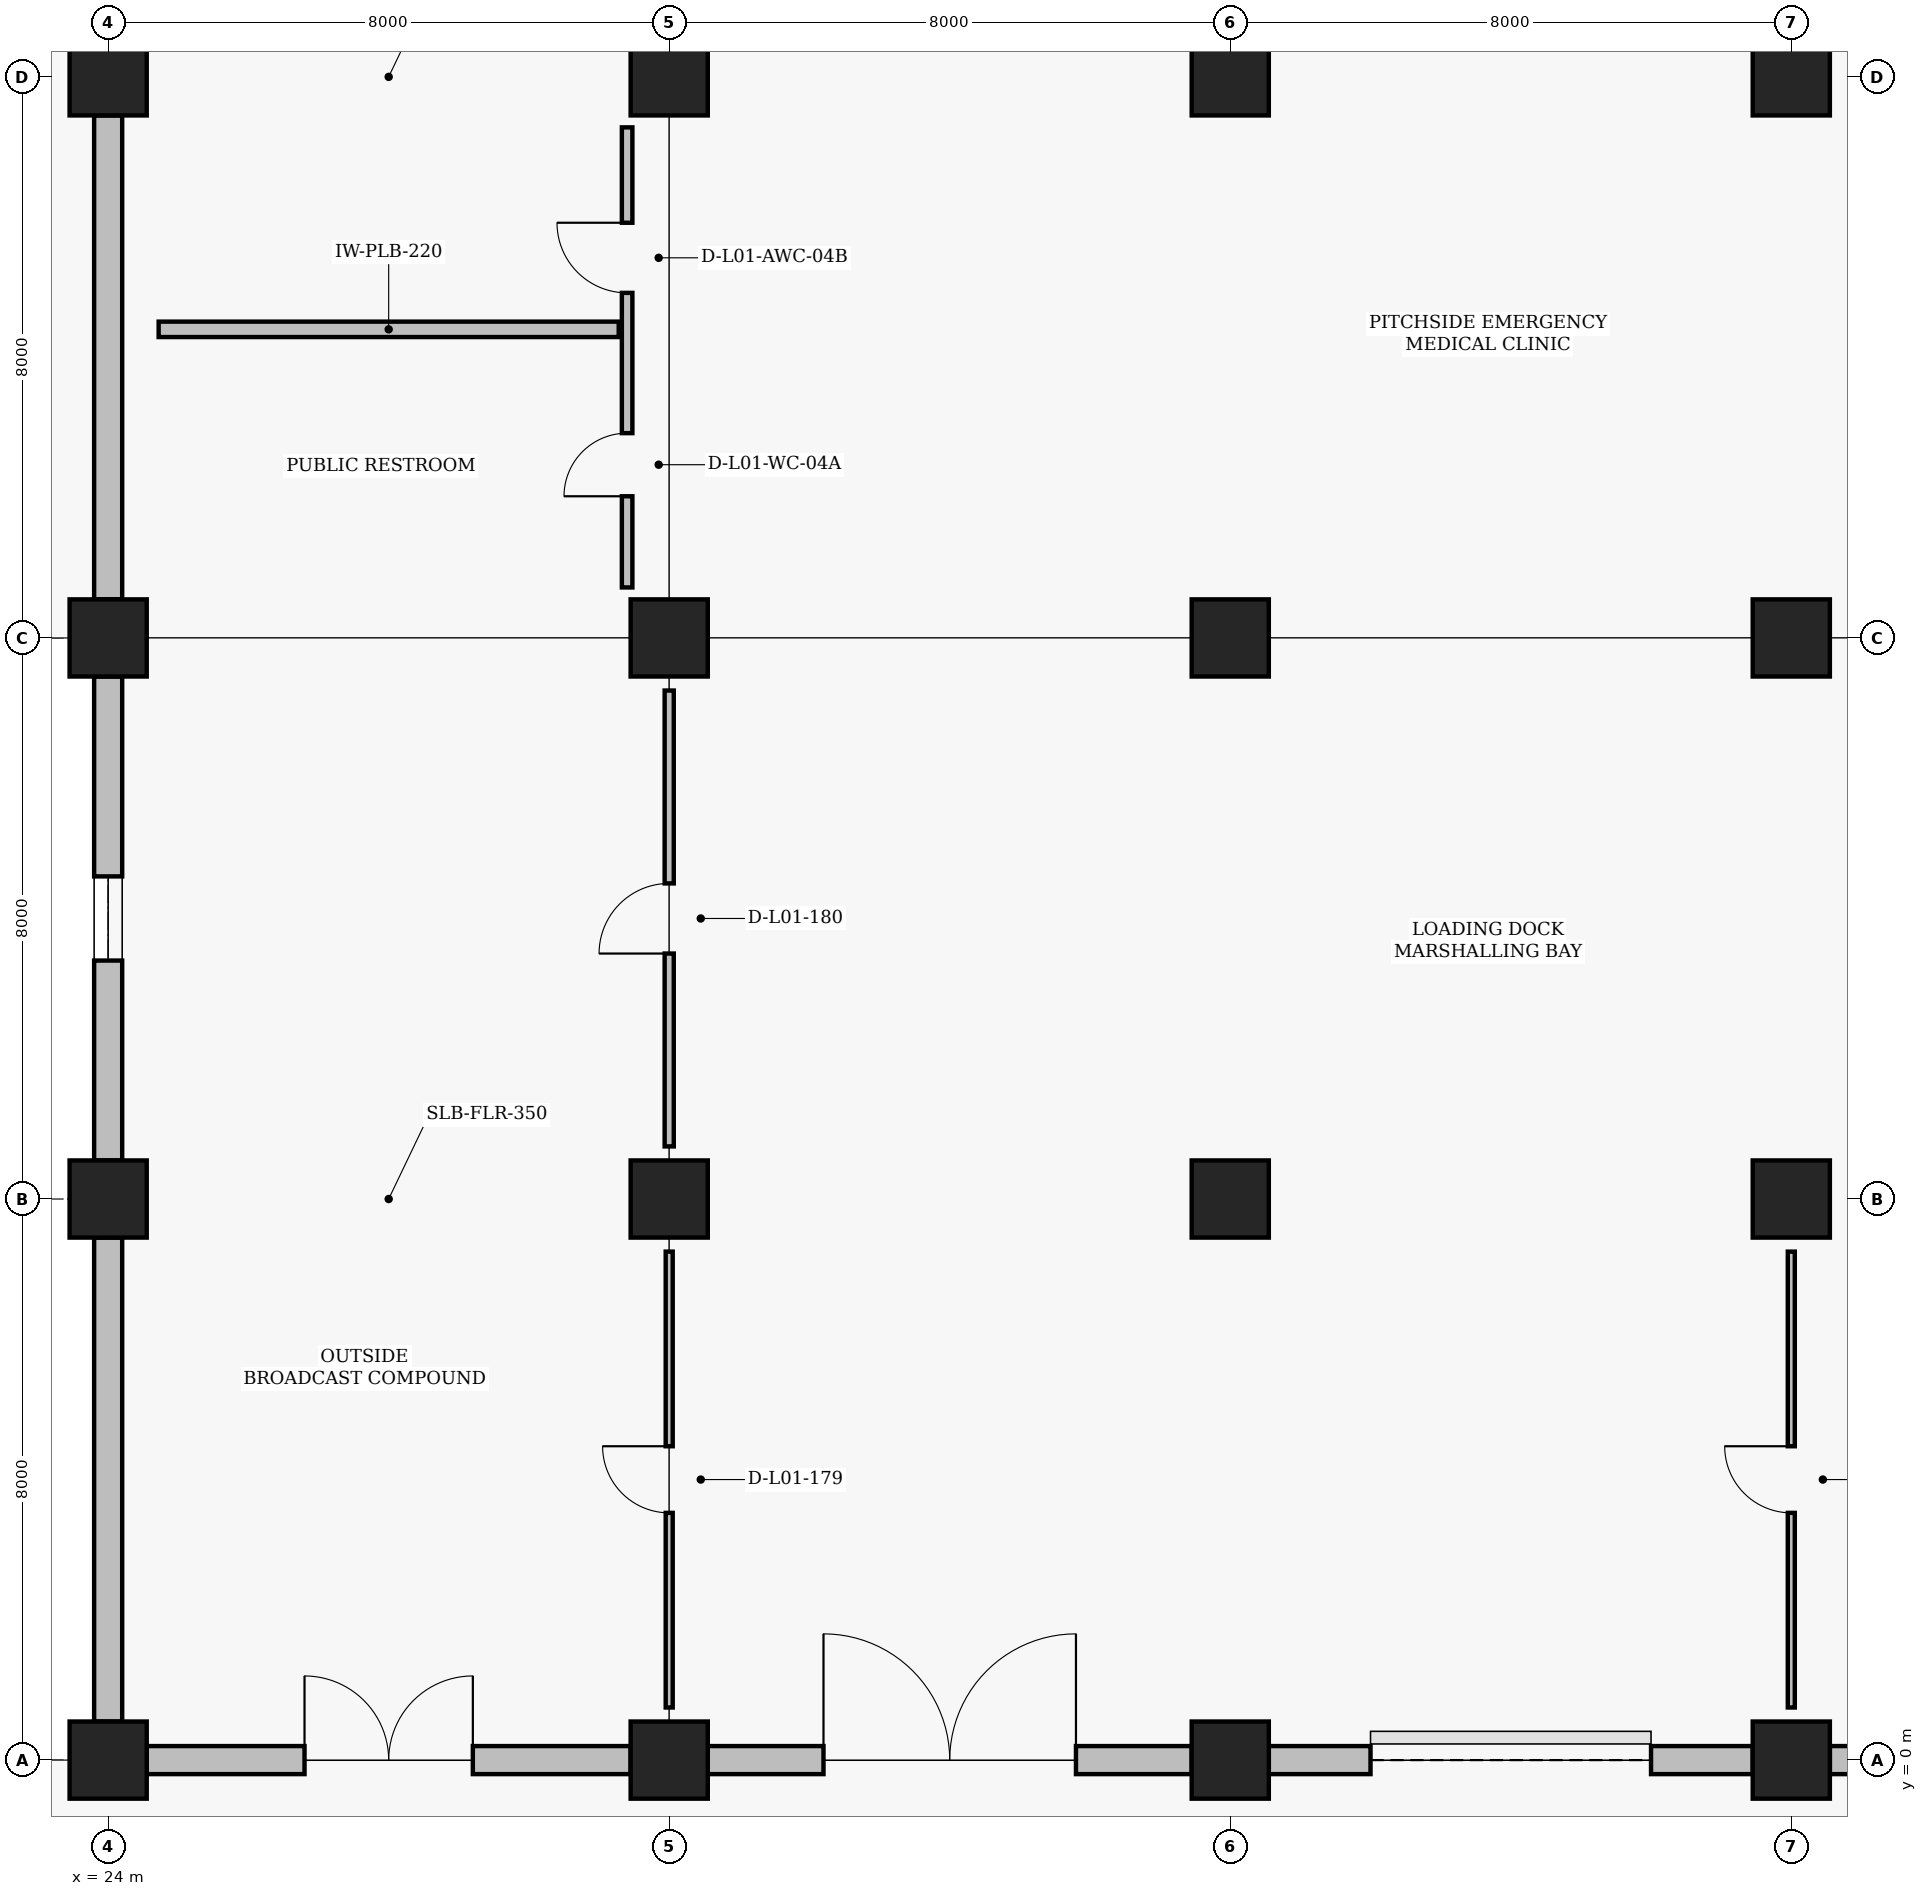
"""IFC4 building model, lengths in metres.
Left out: names, types, materials, properties, quantities, classifications, styles, units other than length and angle.
Written with IfcOpenShell. Run it as: python <this file> out.ifc"""

import sys

from ifc_helpers import new_model, si_unit, direction, frame, frame_2d, origin, origin_2d, place, context, subcontext, project, spatial, rectangle, extrude, element, fill, save


model = new_model("IFC4")
c1 = context("Model", 3, precision=1e-05, world=origin(), true_north=direction((0.0, 1.0)))
c2 = subcontext(c1, "Body", "Model", "MODEL_VIEW")
j1 = project(units=[si_unit("LENGTHUNIT", "METRE"), si_unit("PLANEANGLEUNIT", "RADIAN")], contexts=[c1])
p1 = place(None, origin())
s1 = spatial("IfcSite", under=j1, at=p1, CompositionType="ELEMENT")
p2 = place(p1, origin())
s2 = spatial("IfcBuilding", under=s1, at=p2, CompositionType="ELEMENT")
p3 = place(p2, origin())
s3 = spatial("IfcBuildingStorey", under=s2, at=p3, CompositionType="ELEMENT", Elevation=0.0)
for number, where, z_axis, x_axis in (
    (1, (24.0, 0.0, 0.0), (0.0, 0.0, 1.0), (1.0, 0.0, 0.0)),
    (2, (24.0, 8.0, 0.0), (0.0, 0.0, 1.0), (1.0, 0.0, 0.0)),
    (3, (24.0, 16.0, 0.0), (0.0, 0.0, 1.0), (1.0, 0.0, 0.0)),
    (4, (24.0, 24.0, 0.0), (0.0, 0.0, 1.0), (1.0, 0.0, 0.0)),
    (5, (32.0, 0.0, 0.0), (0.0, 0.0, 1.0), (1.0, 0.0, 0.0)),
    (6, (32.0, 8.0, 0.0), (0.0, 0.0, 1.0), (1.0, 0.0, 0.0)),
    (7, (32.0, 16.0, 0.0), (0.0, 0.0, 1.0), (1.0, 0.0, 0.0)),
    (8, (32.0, 24.0, 0.0), (0.0, 0.0, 1.0), (1.0, 0.0, 0.0)),
    (9, (40.0, 0.0, 0.0), (0.0, 0.0, 1.0), (1.0, 0.0, 0.0)),
    (10, (40.0, 8.0, 0.0), (0.0, 0.0, 1.0), (1.0, 0.0, 0.0)),
    (11, (40.0, 16.0, 0.0), (0.0, 0.0, 1.0), (1.0, 0.0, 0.0)),
    (12, (40.0, 24.0, 0.0), (0.0, 0.0, 1.0), (1.0, 0.0, 0.0)),
    (13, (48.0, 0.0, 0.0), (0.0, 0.0, 1.0), (1.0, 0.0, 0.0)),
    (14, (48.0, 8.0, 0.0), (0.0, 0.0, 1.0), (1.0, 0.0, 0.0)),
    (15, (48.0, 16.0, 0.0), (0.0, 0.0, 1.0), (1.0, 0.0, 0.0)),
    (16, (48.0, 24.0, 0.0), (0.0, 0.0, 1.0), (1.0, 0.0, 0.0)),
):
    element("IfcColumn", number, at=place(p3, frame(where, z_axis=z_axis, x_axis=x_axis)), inside=s3, PredefinedType="COLUMN", context=c2, shape_type="SweptSolid", body=[
        extrude(rectangle(XDim=1.1, YDim=1.1, at=origin_2d()), origin(), (0.0, 0.0, 1.0), 4.8),
    ])
p4 = place(p3, frame((24.55, 0.0, 0.0), z_axis=(0.0, 0.0, 1.0), x_axis=(1.0, 0.0, 0.0)))
e17 = element("IfcWall", 17, at=p4, inside=s3, PredefinedType="SOLIDWALL", context=c2, shape_type="SweptSolid", body=[
    extrude(rectangle(XDim=6.9, YDim=0.4, at=frame_2d((3.45, 0.0))), origin(), (0.0, 0.0, 1.0), 3.81),
])
p5 = place(p4, frame((2.25, 0.0, 0.0)))
e18 = element("IfcOpeningElement", 18, at=p5, cuts=e17, PredefinedType="OPENING", context=c2, shape_type="SweptSolid", body=[
    extrude(rectangle(XDim=2.4, YDim=2.4, at=frame_2d((1.2, 1.2))), frame((0.0, 0.21, 0.0), z_axis=(0.0, -1.0, 0.0), x_axis=(1.0, 0.0, 0.0)), (0.0, 0.0, 1.0), 0.42),
])
p6 = place(p3, frame((24.0, 0.55, 0.0), z_axis=(0.0, 0.0, 1.0), x_axis=(0.0, 1.0, 0.0)))
e19 = element("IfcWall", 19, at=p6, inside=s3, PredefinedType="SOLIDWALL", context=c2, shape_type="SweptSolid", body=[
    extrude(rectangle(XDim=6.9, YDim=0.4, at=frame_2d((3.45, 0.0))), origin(), (0.0, 0.0, 1.0), 3.95),
])
p7 = place(p3, frame((24.0, 8.55, 0.0), z_axis=(0.0, 0.0, 1.0), x_axis=(0.0, 1.0, 0.0)))
e20 = element("IfcWall", 20, at=p7, inside=s3, PredefinedType="SOLIDWALL", context=c2, shape_type="SweptSolid", body=[
    extrude(rectangle(XDim=6.9, YDim=0.4, at=frame_2d((3.45, 0.0))), origin(), (0.0, 0.0, 1.0), 3.72),
])
p8 = place(p7, frame((2.85, 0.0, 0.95)))
e21 = element("IfcOpeningElement", 21, at=p8, cuts=e20, PredefinedType="OPENING", context=c2, shape_type="SweptSolid", body=[
    extrude(rectangle(XDim=1.2, YDim=1.5, at=frame_2d((0.6, 0.75))), frame((0.0, 0.21, 0.0), z_axis=(0.0, -1.0, 0.0), x_axis=(1.0, 0.0, 0.0)), (0.0, 0.0, 1.0), 0.42),
])
p9 = place(p3, frame((24.0, 16.55, 0.0), z_axis=(0.0, 0.0, 1.0), x_axis=(0.0, 1.0, 0.0)))
e22 = element("IfcWall", 22, at=p9, inside=s3, PredefinedType="SOLIDWALL", context=c2, shape_type="SweptSolid", body=[
    extrude(rectangle(XDim=6.9, YDim=0.4, at=frame_2d((3.45, 0.0))), origin(), (0.0, 0.0, 1.0), 3.72),
])
p10 = place(p3, frame((32.55, 0.0, 0.0), z_axis=(0.0, 0.0, 1.0), x_axis=(1.0, 0.0, 0.0)))
e23 = element("IfcWall", 23, at=p10, inside=s3, PredefinedType="SOLIDWALL", context=c2, shape_type="SweptSolid", body=[
    extrude(rectangle(XDim=6.9, YDim=0.4, at=frame_2d((3.45, 0.0))), origin(), (0.0, 0.0, 1.0), 3.81),
])
p11 = place(p10, frame((1.65, 0.0, 0.0)))
e24 = element("IfcOpeningElement", 24, at=p11, cuts=e23, PredefinedType="OPENING", context=c2, shape_type="SweptSolid", body=[
    extrude(rectangle(XDim=3.6, YDim=2.8, at=frame_2d((1.8, 1.4))), frame((0.0, 0.21, 0.0), z_axis=(0.0, -1.0, 0.0), x_axis=(1.0, 0.0, 0.0)), (0.0, 0.0, 1.0), 0.42),
])
p12 = place(p3, frame((40.55, 0.0, 0.0), z_axis=(0.0, 0.0, 1.0), x_axis=(1.0, 0.0, 0.0)))
e25 = element("IfcWall", 25, at=p12, inside=s3, PredefinedType="SOLIDWALL", context=c2, shape_type="SweptSolid", body=[
    extrude(rectangle(XDim=6.9, YDim=0.4, at=frame_2d((3.45, 0.0))), origin(), (0.0, 0.0, 1.0), 3.81),
])
p13 = place(p12, frame((1.45, 0.0, 0.0)))
e26 = element("IfcOpeningElement", 26, at=p13, cuts=e25, PredefinedType="OPENING", context=c2, shape_type="SweptSolid", body=[
    extrude(rectangle(XDim=4.0, YDim=3.5, at=frame_2d((2.0, 1.75))), frame((0.0, 0.21, 0.0), z_axis=(0.0, -1.0, 0.0), x_axis=(1.0, 0.0, 0.0)), (0.0, 0.0, 1.0), 0.42),
])
p14 = place(p3, frame((48.55, 0.0, 0.0), z_axis=(0.0, 0.0, 1.0), x_axis=(1.0, 0.0, 0.0)))
e27 = element("IfcWall", 27, at=p14, inside=s3, PredefinedType="SOLIDWALL", context=c2, shape_type="SweptSolid", body=[
    extrude(rectangle(XDim=6.9, YDim=0.4, at=frame_2d((3.45, 0.0))), origin(), (0.0, 0.0, 1.0), 3.81),
])
p15 = place(p14, frame((1.75, 0.0, 0.0)))
e28 = element("IfcOpeningElement", 28, at=p15, cuts=e27, PredefinedType="OPENING", context=c2, shape_type="SweptSolid", body=[
    extrude(rectangle(XDim=3.4, YDim=2.75, at=frame_2d((1.7, 1.375))), frame((0.0, 0.21, 0.0), z_axis=(0.0, -1.0, 0.0), x_axis=(1.0, 0.0, 0.0)), (0.0, 0.0, 1.0), 0.42),
])
p16 = place(p3, frame((24.72, 20.4, 0.0), z_axis=(0.0, 0.0, 1.0), x_axis=(1.0, 0.0, 0.0)))
e29 = element("IfcWall", 29, at=p16, inside=s3, PredefinedType="PLUMBINGWALL", context=c2, shape_type="SweptSolid", body=[
    extrude(rectangle(XDim=6.56, YDim=0.22, at=frame_2d((3.28, 0.0))), origin(), (0.0, 0.0, 1.0), 4.17),
])
p17 = place(p3, frame((31.4, 16.72, 0.0), z_axis=(0.0, 0.0, 1.0), x_axis=(0.0, 1.0, 0.0)))
e30 = element("IfcWall", 30, at=p17, inside=s3, PredefinedType="PARTITIONING", context=c2, shape_type="SweptSolid", body=[
    extrude(rectangle(XDim=6.56, YDim=0.15, at=frame_2d((3.28, 0.0))), origin(), (0.0, 0.0, 1.0), 3.72),
])
p18 = place(p17, frame((1.3, 0.0, 0.0)))
e31 = element("IfcOpeningElement", 31, at=p18, cuts=e30, PredefinedType="OPENING", context=c2, shape_type="SweptSolid", body=[
    extrude(rectangle(XDim=0.9, YDim=2.1, at=frame_2d((0.45, 1.05))), frame((0.0, 0.085, 0.0), z_axis=(0.0, -1.0, 0.0), x_axis=(1.0, 0.0, 0.0)), (0.0, 0.0, 1.0), 0.17),
])
p19 = place(p17, frame((4.2, 0.0, 0.0)))
e32 = element("IfcOpeningElement", 32, at=p19, cuts=e30, PredefinedType="OPENING", context=c2, shape_type="SweptSolid", body=[
    extrude(rectangle(XDim=1.0, YDim=2.15, at=frame_2d((0.5, 1.075))), frame((0.0, 0.085, 0.0), z_axis=(0.0, -1.0, 0.0), x_axis=(1.0, 0.0, 0.0)), (0.0, 0.0, 1.0), 0.17),
])
p20 = place(p3, frame((32.0, 0.75, 0.0), z_axis=(0.0, 0.0, 1.0), x_axis=(0.0, 1.0, 0.0)))
e33 = element("IfcWall", 33, at=p20, inside=s3, PredefinedType="PARTITIONING", context=c2, shape_type="SweptSolid", body=[
    extrude(rectangle(XDim=6.5, YDim=0.1, at=frame_2d((3.25, 0.0))), origin(), (0.0, 0.0, 1.0), 3.81),
])
p21 = place(p20, frame((2.775, 0.0, 0.0)))
e34 = element("IfcOpeningElement", 34, at=p21, cuts=e33, PredefinedType="OPENING", context=c2, shape_type="SweptSolid", body=[
    extrude(rectangle(XDim=0.95, YDim=2.1, at=frame_2d((0.475, 1.05))), frame((0.0, 0.06, 0.0), z_axis=(0.0, -1.0, 0.0), x_axis=(1.0, 0.0, 0.0)), (0.0, 0.0, 1.0), 0.12),
])
p22 = place(p3, frame((32.0, 8.75, 0.0), z_axis=(0.0, 0.0, 1.0), x_axis=(0.0, 1.0, 0.0)))
e35 = element("IfcWall", 35, at=p22, inside=s3, PredefinedType="PARTITIONING", context=c2, shape_type="SweptSolid", body=[
    extrude(rectangle(XDim=6.5, YDim=0.13, at=frame_2d((3.25, 0.0))), origin(), (0.0, 0.0, 1.0), 3.81),
])
p23 = place(p22, frame((2.75, 0.0, 0.0)))
e36 = element("IfcOpeningElement", 36, at=p23, cuts=e35, PredefinedType="OPENING", context=c2, shape_type="SweptSolid", body=[
    extrude(rectangle(XDim=1.0, YDim=2.1, at=frame_2d((0.5, 1.05))), frame((0.0, 0.075, 0.0), z_axis=(0.0, -1.0, 0.0), x_axis=(1.0, 0.0, 0.0)), (0.0, 0.0, 1.0), 0.15),
])
p24 = place(p3, frame((48.0, 0.75, 0.0), z_axis=(0.0, 0.0, 1.0), x_axis=(0.0, 1.0, 0.0)))
e37 = element("IfcWall", 37, at=p24, inside=s3, PredefinedType="PARTITIONING", context=c2, shape_type="SweptSolid", body=[
    extrude(rectangle(XDim=6.5, YDim=0.1, at=frame_2d((3.25, 0.0))), origin(), (0.0, 0.0, 1.0), 3.81),
])
p25 = place(p24, frame((2.775, 0.0, 0.0)))
e38 = element("IfcOpeningElement", 38, at=p25, cuts=e37, PredefinedType="OPENING", context=c2, shape_type="SweptSolid", body=[
    extrude(rectangle(XDim=0.95, YDim=2.1, at=frame_2d((0.475, 1.05))), frame((0.0, 0.06, 0.0), z_axis=(0.0, -1.0, 0.0), x_axis=(1.0, 0.0, 0.0)), (0.0, 0.0, 1.0), 0.12),
])
p26 = place(p5, origin())
e39 = element("IfcDoor", 39, at=p26, inside=s3, OperationType="DOUBLE_SWING_LEFT", PredefinedType="DOOR", context=c2, shape_type="SweptSolid", body=[
    extrude(rectangle(XDim=2.4, YDim=2.4, at=frame_2d((1.2, 1.2))), frame((0.0, 0.025, 0.0), z_axis=(0.0, -1.0, 0.0), x_axis=(1.0, 0.0, 0.0)), (0.0, 0.0, 1.0), 0.05),
])
fill(e18, e39)
p27 = place(p8, origin())
e40 = element("IfcWindow", 40, at=p27, inside=s3, PartitioningType="SINGLE_PANEL", PredefinedType="WINDOW", context=c2, shape_type="SweptSolid", body=[
    extrude(rectangle(XDim=1.2, YDim=1.5, at=frame_2d((0.6, 0.75))), frame((0.0, 0.03, 0.0), z_axis=(0.0, -1.0, 0.0), x_axis=(1.0, 0.0, 0.0)), (0.0, 0.0, 1.0), 0.06),
])
fill(e21, e40)
p28 = place(p11, origin())
e41 = element("IfcDoor", 41, at=p28, inside=s3, OperationType="DOUBLE_SWING_LEFT", PredefinedType="DOOR", context=c2, shape_type="SweptSolid", body=[
    extrude(rectangle(XDim=3.6, YDim=2.8, at=frame_2d((1.8, 1.4))), frame((0.0, 0.025, 0.0), z_axis=(0.0, -1.0, 0.0), x_axis=(1.0, 0.0, 0.0)), (0.0, 0.0, 1.0), 0.05),
])
fill(e24, e41)
p29 = place(p13, origin())
e42 = element("IfcDoor", 42, at=p29, inside=s3, OperationType="ROLLINGUP", PredefinedType="GATE", context=c2, shape_type="SweptSolid", body=[
    extrude(rectangle(XDim=4.0, YDim=3.5, at=frame_2d((2.0, 1.75))), frame((0.0, 0.025, 0.0), z_axis=(0.0, -1.0, 0.0), x_axis=(1.0, 0.0, 0.0)), (0.0, 0.0, 1.0), 0.05),
])
fill(e26, e42)
p30 = place(p18, origin())
e43 = element("IfcDoor", 43, at=p30, inside=s3, OperationType="SINGLE_SWING_LEFT", PredefinedType="DOOR", context=c2, shape_type="SweptSolid", body=[
    extrude(rectangle(XDim=0.9, YDim=2.1, at=frame_2d((0.45, 1.05))), frame((0.0, 0.025, 0.0), z_axis=(0.0, -1.0, 0.0), x_axis=(1.0, 0.0, 0.0)), (0.0, 0.0, 1.0), 0.05),
])
fill(e31, e43)
p31 = place(p19, origin())
e44 = element("IfcDoor", 44, at=p31, inside=s3, OperationType="SINGLE_SWING_RIGHT", PredefinedType="DOOR", context=c2, shape_type="SweptSolid", body=[
    extrude(rectangle(XDim=1.0, YDim=2.15, at=frame_2d((0.5, 1.075))), frame((0.0, 0.025, 0.0), z_axis=(0.0, -1.0, 0.0), x_axis=(1.0, 0.0, 0.0)), (0.0, 0.0, 1.0), 0.05),
])
fill(e32, e44)
p32 = place(p21, origin())
e45 = element("IfcDoor", 45, at=p32, inside=s3, OperationType="SINGLE_SWING_RIGHT", PredefinedType="DOOR", context=c2, shape_type="SweptSolid", body=[
    extrude(rectangle(XDim=0.95, YDim=2.1, at=frame_2d((0.475, 1.05))), frame((0.0, 0.025, 0.0), z_axis=(0.0, -1.0, 0.0), x_axis=(1.0, 0.0, 0.0)), (0.0, 0.0, 1.0), 0.05),
])
fill(e34, e45)
p33 = place(p23, origin())
e46 = element("IfcDoor", 46, at=p33, inside=s3, OperationType="SINGLE_SWING_LEFT", PredefinedType="DOOR", context=c2, shape_type="SweptSolid", body=[
    extrude(rectangle(XDim=1.0, YDim=2.1, at=frame_2d((0.5, 1.05))), frame((0.0, 0.025, 0.0), z_axis=(0.0, -1.0, 0.0), x_axis=(1.0, 0.0, 0.0)), (0.0, 0.0, 1.0), 0.05),
])
fill(e36, e46)
p34 = place(p25, origin())
e47 = element("IfcDoor", 47, at=p34, inside=s3, OperationType="SINGLE_SWING_RIGHT", PredefinedType="DOOR", context=c2, shape_type="SweptSolid", body=[
    extrude(rectangle(XDim=0.95, YDim=2.1, at=frame_2d((0.475, 1.05))), frame((0.0, 0.025, 0.0), z_axis=(0.0, -1.0, 0.0), x_axis=(1.0, 0.0, 0.0)), (0.0, 0.0, 1.0), 0.05),
])
fill(e38, e47)
save(model, sys.argv[1])
